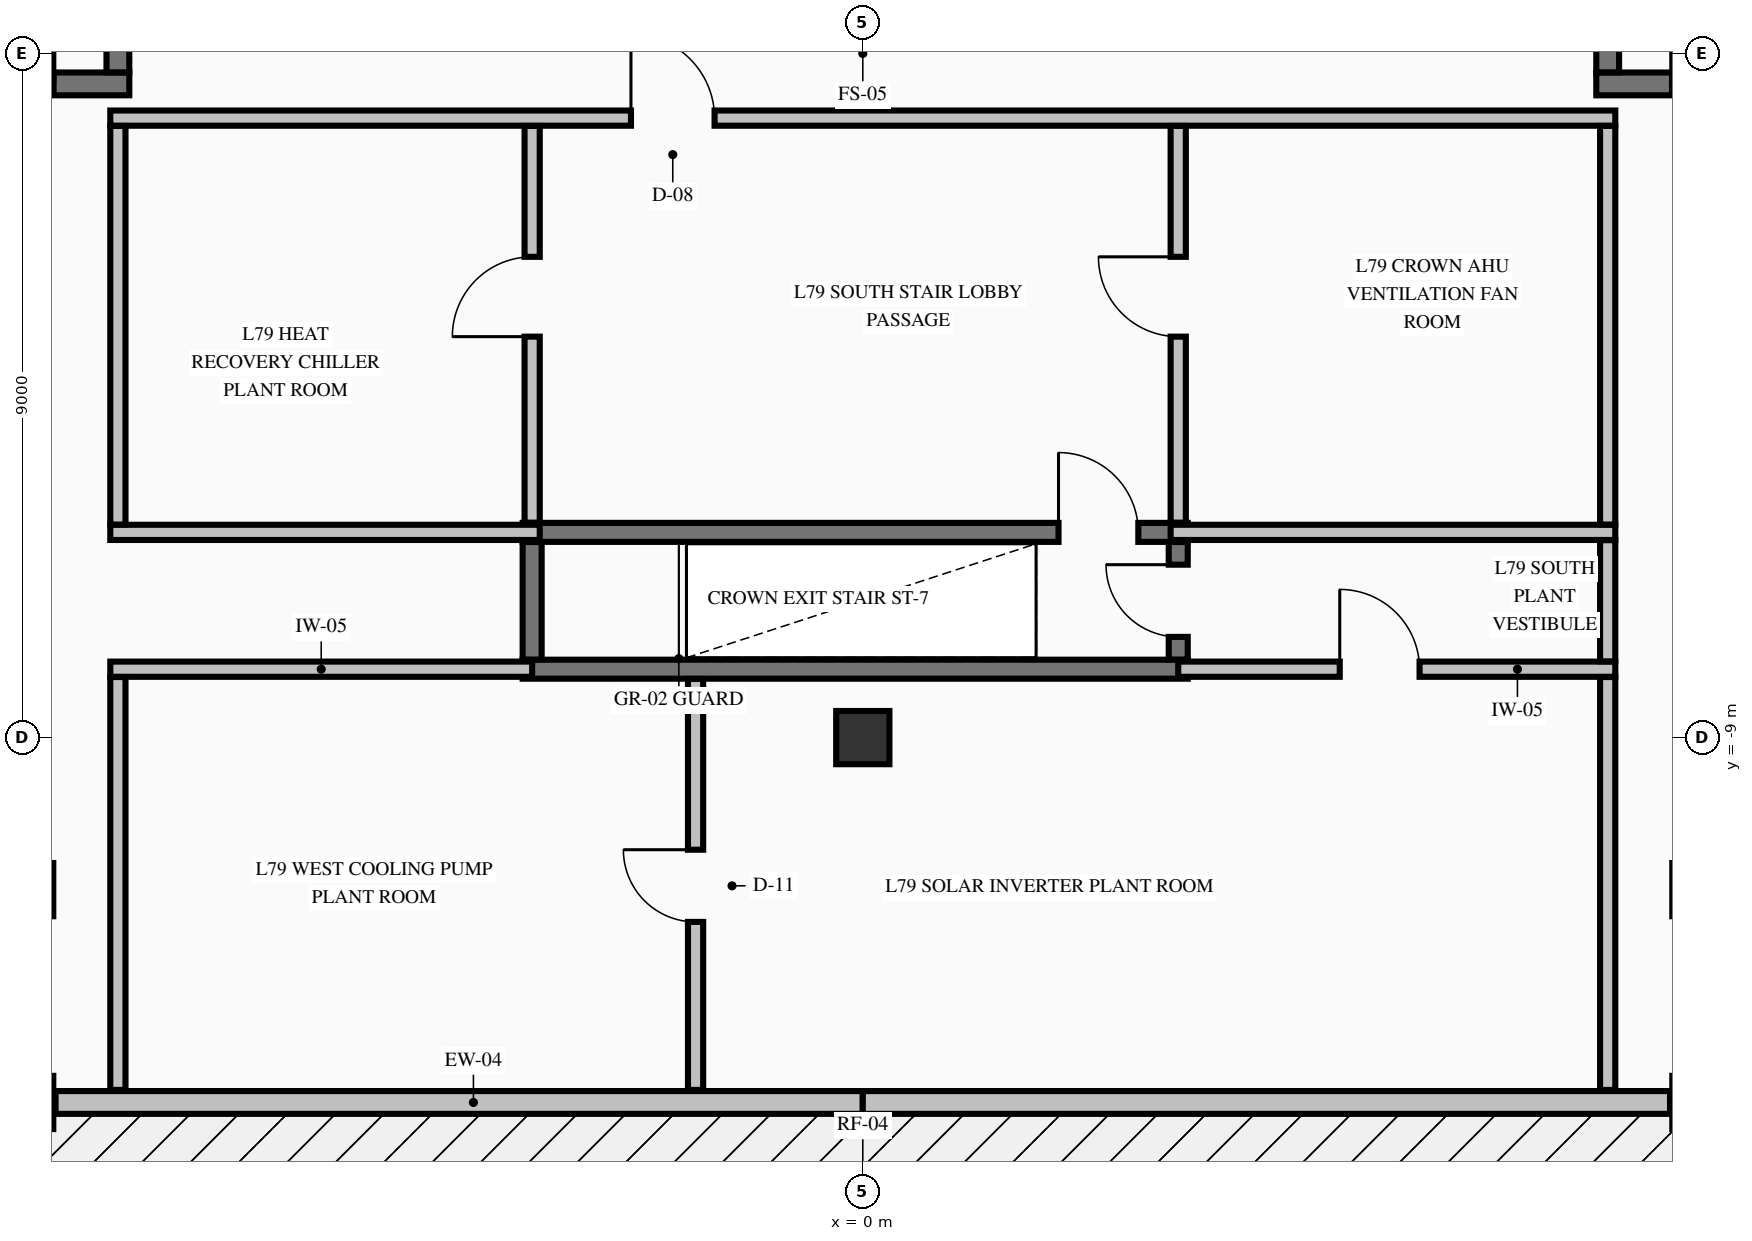
"""IFC4 building model, lengths in metres.
Left out: names, types, materials, properties, quantities, classifications, styles, units other than length and angle.
Written with IfcOpenShell. Run it as: python <this file> out.ifc"""

import sys

from ifc_helpers import new_model, si_unit, direction, frame, frame_2d, origin, origin_2d, place, context, subcontext, project, spatial, rectangle, extrude, element, fill, save


model = new_model("IFC4")
c1 = context("Model", 3, precision=1e-05, world=origin(), true_north=direction((0.0, 1.0)))
c2 = subcontext(c1, "Body", "Model", "MODEL_VIEW")
j1 = project(units=[si_unit("LENGTHUNIT", "METRE"), si_unit("PLANEANGLEUNIT", "RADIAN")], contexts=[c1])
p1 = place(None, origin())
s1 = spatial("IfcSite", under=j1, at=p1, CompositionType="ELEMENT")
p2 = place(p1, origin())
s2 = spatial("IfcBuilding", under=s1, at=p2, CompositionType="ELEMENT")
p3 = place(p2, frame((0.0, 0.0, 294.04)))
s3 = spatial("IfcBuildingStorey", under=s2, at=p3, CompositionType="ELEMENT", Elevation=294.04)
for number, where, z_axis, x_axis in (
    (1, (-11.0, -13.8, -0.325), (0.0, 0.0, 1.0), (1.0, 0.0, 0.0)),
    (2, (11.0, -13.8, -0.325), (0.0, 0.0, 1.0), (1.0, 0.0, 0.0)),
    (3, (-11.0, -11.0, -0.325), (0.0, 0.0, 1.0), (1.0, 0.0, 0.0)),
    (4, (11.0, -11.0, -0.325), (0.0, 0.0, 1.0), (1.0, 0.0, 0.0)),
    (5, (-11.0, 0.0, -0.325), (0.0, 0.0, 1.0), (1.0, 0.0, 0.0)),
    (6, (11.0, 0.0, -0.325), (0.0, 0.0, 1.0), (1.0, 0.0, 0.0)),
    (7, (0.0, -9.0, -0.325), (0.0, 0.0, 1.0), (1.0, 0.0, 0.0)),
):
    element("IfcColumn", number, at=place(p3, frame(where, z_axis=z_axis, x_axis=x_axis)), inside=s3, PredefinedType="COLUMN", context=c2, shape_type="SweptSolid", body=[
        extrude(rectangle(XDim=0.7, YDim=0.7, at=origin_2d()), origin(), (0.0, 0.0, 1.0), 2.935),
    ])
for number, where, z_axis, x_axis in (
    (8, (-10.62, -13.8, 0.0), (0.0, 0.0, 1.0), (1.0, 0.0, 0.0)),
    (9, (0.0, -13.8, 0.0), (0.0, 0.0, 1.0), (1.0, 0.0, 0.0)),
):
    element("IfcWall", number, at=place(p3, frame(where, z_axis=z_axis, x_axis=x_axis)), inside=s3, PredefinedType="STANDARD", context=c2, shape_type="SweptSolid", body=[
        extrude(rectangle(XDim=10.62, YDim=0.3, at=frame_2d((5.31, 0.0))), origin(), (0.0, 0.0, 1.0), 2.002),
    ])
p4 = place(p3, frame((-4.475, -8.1, 0.0), z_axis=(0.0, 0.0, 1.0), x_axis=(1.0, 0.0, 0.0)))
e10 = element("IfcWall", 10, at=p4, inside=s3, PredefinedType="SOLIDWALL", context=c2, shape_type="SweptSolid", body=[
    extrude(rectangle(XDim=8.75, YDim=0.25, at=frame_2d((4.375, 0.0))), origin(), (0.0, 0.0, 1.0), 2.61),
])
p5 = place(p3, frame((-4.475, -6.3, 0.0), z_axis=(0.0, 0.0, 1.0), x_axis=(1.0, 0.0, 0.0)))
e11 = element("IfcWall", 11, at=p5, inside=s3, PredefinedType="SOLIDWALL", context=c2, shape_type="SweptSolid", body=[
    extrude(rectangle(XDim=8.75, YDim=0.25, at=frame_2d((4.375, 0.0))), origin(), (0.0, 0.0, 1.0), 2.61),
])
p6 = place(p5, frame((7.05, 0.0, 0.0)))
e12 = element("IfcOpeningElement", 12, at=p6, cuts=e11, PredefinedType="OPENING", context=c2, shape_type="SweptSolid", body=[
    extrude(rectangle(XDim=1.05, YDim=2.15, at=frame_2d((0.525, 1.075))), frame((0.0, 0.135, 0.0), z_axis=(0.0, -1.0, 0.0), x_axis=(1.0, 0.0, 0.0)), (0.0, 0.0, 1.0), 0.27),
])
for number, where, z_axis, x_axis in (
    (13, (-10.646, -0.4, 0.0), (0.0, 0.0, 1.0), (1.0, 0.0, 0.0)),
    (14, (9.65, -0.4, 0.0), (0.0, 0.0, 1.0), (1.0, 0.0, 0.0)),
):
    element("IfcWall", number, at=place(p3, frame(where, z_axis=z_axis, x_axis=x_axis)), inside=s3, PredefinedType="SHEAR", context=c2, shape_type="SweptSolid", body=[
        extrude(rectangle(XDim=0.996, YDim=0.3, at=frame_2d((0.498, 0.0))), origin(), (0.0, 0.0, 1.0), 2.61),
    ])
p7 = place(p3, frame((-9.9, -8.1, 0.0), z_axis=(0.0, 0.0, 1.0), x_axis=(1.0, 0.0, 0.0)))
e15 = element("IfcWall", 15, at=p7, inside=s3, PredefinedType="PARTITIONING", context=c2, shape_type="SweptSolid", body=[
    extrude(rectangle(XDim=5.55, YDim=0.2, at=frame_2d((2.775, 0.0))), origin(), (0.0, 0.0, 1.0), 2.61),
])
p8 = place(p3, frame((4.15, -8.1, 0.0), z_axis=(0.0, 0.0, 1.0), x_axis=(1.0, 0.0, 0.0)))
e16 = element("IfcWall", 16, at=p8, inside=s3, PredefinedType="PARTITIONING", context=c2, shape_type="SweptSolid", body=[
    extrude(rectangle(XDim=5.75, YDim=0.2, at=frame_2d((2.875, 0.0))), origin(), (0.0, 0.0, 1.0), 2.61),
])
p9 = place(p8, frame((2.125, 0.0, 0.0)))
e17 = element("IfcOpeningElement", 17, at=p9, cuts=e16, PredefinedType="OPENING", context=c2, shape_type="SweptSolid", body=[
    extrude(rectangle(XDim=1.05, YDim=2.15, at=frame_2d((0.525, 1.075))), frame((0.0, 0.11, 0.0), z_axis=(0.0, -1.0, 0.0), x_axis=(1.0, 0.0, 0.0)), (0.0, 0.0, 1.0), 0.22),
])
p10 = place(p3, frame((-9.9, -6.3, 0.0), z_axis=(0.0, 0.0, 1.0), x_axis=(1.0, 0.0, 0.0)))
e18 = element("IfcWall", 18, at=p10, inside=s3, PredefinedType="PARTITIONING", context=c2, shape_type="SweptSolid", body=[
    extrude(rectangle(XDim=5.65, YDim=0.2, at=frame_2d((2.825, 0.0))), origin(), (0.0, 0.0, 1.0), 2.61),
])
p11 = place(p3, frame((4.05, -6.3, 0.0), z_axis=(0.0, 0.0, 1.0), x_axis=(1.0, 0.0, 0.0)))
e19 = element("IfcWall", 19, at=p11, inside=s3, PredefinedType="PARTITIONING", context=c2, shape_type="SweptSolid", body=[
    extrude(rectangle(XDim=5.85, YDim=0.2, at=frame_2d((2.925, 0.0))), origin(), (0.0, 0.0, 1.0), 2.61),
])
p12 = place(p3, frame((-9.9, -0.85, 0.0), z_axis=(0.0, 0.0, 1.0), x_axis=(1.0, 0.0, 0.0)))
e20 = element("IfcWall", 20, at=p12, inside=s3, PredefinedType="PARTITIONING", context=c2, shape_type="SweptSolid", body=[
    extrude(rectangle(XDim=19.8, YDim=0.2, at=frame_2d((9.9, 0.0))), origin(), (0.0, 0.0, 1.0), 2.61),
])
p13 = place(p12, frame((6.85, 0.0, 0.0)))
e21 = element("IfcOpeningElement", 21, at=p13, cuts=e20, PredefinedType="OPENING", context=c2, shape_type="SweptSolid", body=[
    extrude(rectangle(XDim=1.1, YDim=2.15, at=frame_2d((0.55, 1.075))), frame((0.0, 0.11, 0.0), z_axis=(0.0, -1.0, 0.0), x_axis=(1.0, 0.0, 0.0)), (0.0, 0.0, 1.0), 0.22),
])
p14 = place(p3, frame((-9.8, -0.248, 0.0), z_axis=(0.0, 0.0, 1.0), x_axis=(0.0, 1.0, 0.0)))
e22 = element("IfcWall", 22, at=p14, inside=s3, PredefinedType="SHEAR", context=c2, shape_type="SweptSolid", body=[
    extrude(rectangle(XDim=3.046, YDim=0.3, at=frame_2d((1.523, 0.0))), origin(), (0.0, 0.0, 1.0), 2.61),
])
p15 = place(p14, frame((1.023, 0.0, 0.0)))
e23 = element("IfcOpeningElement", 23, at=p15, cuts=e22, PredefinedType="OPENING", context=c2, shape_type="SweptSolid", body=[
    extrude(rectangle(XDim=1.05, YDim=2.15, at=frame_2d((0.525, 1.075))), frame((0.0, 0.16, 0.0), z_axis=(0.0, -1.0, 0.0), x_axis=(1.0, 0.0, 0.0)), (0.0, 0.0, 1.0), 0.32),
])
p16 = place(p3, frame((-4.35, -7.973, 0.0), z_axis=(0.0, 0.0, 1.0), x_axis=(0.0, 1.0, 0.0)))
e24 = element("IfcWall", 24, at=p16, inside=s3, PredefinedType="SOLIDWALL", context=c2, shape_type="SweptSolid", body=[
    extrude(rectangle(XDim=1.546, YDim=0.25, at=frame_2d((0.773, 0.0))), origin(), (0.0, 0.0, 1.0), 2.61),
])
p17 = place(p3, frame((4.15, -7.973, 0.0), z_axis=(0.0, 0.0, 1.0), x_axis=(0.0, 1.0, 0.0)))
e25 = element("IfcWall", 25, at=p17, inside=s3, PredefinedType="SOLIDWALL", context=c2, shape_type="SweptSolid", body=[
    extrude(rectangle(XDim=1.546, YDim=0.25, at=frame_2d((0.773, 0.0))), origin(), (0.0, 0.0, 1.0), 2.61),
])
p18 = place(p17, frame((0.298, 0.0, 0.0)))
e26 = element("IfcOpeningElement", 26, at=p18, cuts=e25, PredefinedType="OPENING", context=c2, shape_type="SweptSolid", body=[
    extrude(rectangle(XDim=0.95, YDim=2.15, at=frame_2d((0.475, 1.075))), frame((0.0, 0.135, 0.0), z_axis=(0.0, -1.0, 0.0), x_axis=(1.0, 0.0, 0.0)), (0.0, 0.0, 1.0), 0.27),
])
p19 = place(p3, frame((9.8, -0.248, 0.0), z_axis=(0.0, 0.0, 1.0), x_axis=(0.0, 1.0, 0.0)))
e27 = element("IfcWall", 27, at=p19, inside=s3, PredefinedType="SHEAR", context=c2, shape_type="SweptSolid", body=[
    extrude(rectangle(XDim=3.046, YDim=0.3, at=frame_2d((1.523, 0.0))), origin(), (0.0, 0.0, 1.0), 2.61),
])
p20 = place(p19, frame((1.023, 0.0, 0.0)))
e28 = element("IfcOpeningElement", 28, at=p20, cuts=e27, PredefinedType="OPENING", context=c2, shape_type="SweptSolid", body=[
    extrude(rectangle(XDim=1.05, YDim=2.15, at=frame_2d((0.525, 1.075))), frame((0.0, 0.16, 0.0), z_axis=(0.0, -1.0, 0.0), x_axis=(1.0, 0.0, 0.0)), (0.0, 0.0, 1.0), 0.32),
])
p21 = place(p3, frame((-9.8, -13.635, 0.0), z_axis=(0.0, 0.0, 1.0), x_axis=(0.0, 1.0, 0.0)))
e29 = element("IfcWall", 29, at=p21, inside=s3, PredefinedType="PARTITIONING", context=c2, shape_type="SweptSolid", body=[
    extrude(rectangle(XDim=5.432, YDim=0.2, at=frame_2d((2.716, 0.0))), origin(), (0.0, 0.0, 1.0), 2.61),
])
p22 = place(p3, frame((-9.8, -6.197, 0.0), z_axis=(0.0, 0.0, 1.0), x_axis=(0.0, 1.0, 0.0)))
e30 = element("IfcWall", 30, at=p22, inside=s3, PredefinedType="PARTITIONING", context=c2, shape_type="SweptSolid", body=[
    extrude(rectangle(XDim=5.244, YDim=0.2, at=frame_2d((2.622, 0.0))), origin(), (0.0, 0.0, 1.0), 2.61),
])
p23 = place(p3, frame((-4.35, -6.172, 0.0), z_axis=(0.0, 0.0, 1.0), x_axis=(0.0, 1.0, 0.0)))
e31 = element("IfcWall", 31, at=p23, inside=s3, PredefinedType="PARTITIONING", context=c2, shape_type="SweptSolid", body=[
    extrude(rectangle(XDim=5.219, YDim=0.2, at=frame_2d((2.61, 0.0))), origin(), (0.0, 0.0, 1.0), 2.61),
])
p24 = place(p23, frame((2.447, 0.0, 0.0)))
e32 = element("IfcOpeningElement", 32, at=p24, cuts=e31, PredefinedType="OPENING", context=c2, shape_type="SweptSolid", body=[
    extrude(rectangle(XDim=1.05, YDim=2.15, at=frame_2d((0.525, 1.075))), frame((0.0, 0.11, 0.0), z_axis=(0.0, -1.0, 0.0), x_axis=(1.0, 0.0, 0.0)), (0.0, 0.0, 1.0), 0.22),
])
p25 = place(p3, frame((-2.2, -13.635, 0.0), z_axis=(0.0, 0.0, 1.0), x_axis=(0.0, 1.0, 0.0)))
e33 = element("IfcWall", 33, at=p25, inside=s3, PredefinedType="PARTITIONING", context=c2, shape_type="SweptSolid", body=[
    extrude(rectangle(XDim=5.407, YDim=0.2, at=frame_2d((2.704, 0.0))), origin(), (0.0, 0.0, 1.0), 2.61),
])
p26 = place(p25, frame((2.21, 0.0, 0.0)))
e34 = element("IfcOpeningElement", 34, at=p26, cuts=e33, PredefinedType="OPENING", context=c2, shape_type="SweptSolid", body=[
    extrude(rectangle(XDim=0.95, YDim=2.15, at=frame_2d((0.475, 1.075))), frame((0.0, 0.11, 0.0), z_axis=(0.0, -1.0, 0.0), x_axis=(1.0, 0.0, 0.0)), (0.0, 0.0, 1.0), 0.22),
])
p27 = place(p3, frame((4.15, -6.172, 0.0), z_axis=(0.0, 0.0, 1.0), x_axis=(0.0, 1.0, 0.0)))
e35 = element("IfcWall", 35, at=p27, inside=s3, PredefinedType="PARTITIONING", context=c2, shape_type="SweptSolid", body=[
    extrude(rectangle(XDim=5.219, YDim=0.2, at=frame_2d((2.61, 0.0))), origin(), (0.0, 0.0, 1.0), 2.61),
])
p28 = place(p27, frame((2.447, 0.0, 0.0)))
e36 = element("IfcOpeningElement", 36, at=p28, cuts=e35, PredefinedType="OPENING", context=c2, shape_type="SweptSolid", body=[
    extrude(rectangle(XDim=1.05, YDim=2.15, at=frame_2d((0.525, 1.075))), frame((0.0, 0.11, 0.0), z_axis=(0.0, -1.0, 0.0), x_axis=(1.0, 0.0, 0.0)), (0.0, 0.0, 1.0), 0.22),
])
p29 = place(p3, frame((9.8, -13.635, 0.0), z_axis=(0.0, 0.0, 1.0), x_axis=(0.0, 1.0, 0.0)))
e37 = element("IfcWall", 37, at=p29, inside=s3, PredefinedType="PARTITIONING", context=c2, shape_type="SweptSolid", body=[
    extrude(rectangle(XDim=5.432, YDim=0.2, at=frame_2d((2.716, 0.0))), origin(), (0.0, 0.0, 1.0), 2.61),
])
p30 = place(p3, frame((9.8, -7.997, 0.0), z_axis=(0.0, 0.0, 1.0), x_axis=(0.0, 1.0, 0.0)))
e38 = element("IfcWall", 38, at=p30, inside=s3, PredefinedType="PARTITIONING", context=c2, shape_type="SweptSolid", body=[
    extrude(rectangle(XDim=1.594, YDim=0.2, at=frame_2d((0.797, 0.0))), origin(), (0.0, 0.0, 1.0), 2.61),
])
p31 = place(p3, frame((9.8, -6.197, 0.0), z_axis=(0.0, 0.0, 1.0), x_axis=(0.0, 1.0, 0.0)))
e39 = element("IfcWall", 39, at=p31, inside=s3, PredefinedType="PARTITIONING", context=c2, shape_type="SweptSolid", body=[
    extrude(rectangle(XDim=5.244, YDim=0.2, at=frame_2d((2.622, 0.0))), origin(), (0.0, 0.0, 1.0), 2.61),
])
p32 = place(p6, origin())
e40 = element("IfcDoor", 40, at=p32, inside=s3, OperationType="SINGLE_SWING_LEFT", PredefinedType="DOOR", context=c2, shape_type="SweptSolid", body=[
    extrude(rectangle(XDim=1.05, YDim=2.15, at=frame_2d((0.525, 1.075))), frame((0.0, 0.025, 0.0), z_axis=(0.0, -1.0, 0.0), x_axis=(1.0, 0.0, 0.0)), (0.0, 0.0, 1.0), 0.05),
])
fill(e12, e40)
p33 = place(p13, origin())
e41 = element("IfcDoor", 41, at=p33, inside=s3, OperationType="SINGLE_SWING_LEFT", PredefinedType="DOOR", context=c2, shape_type="SweptSolid", body=[
    extrude(rectangle(XDim=1.1, YDim=2.15, at=frame_2d((0.55, 1.075))), frame((0.0, 0.025, 0.0), z_axis=(0.0, -1.0, 0.0), x_axis=(1.0, 0.0, 0.0)), (0.0, 0.0, 1.0), 0.05),
])
fill(e21, e41)
p34 = place(p24, origin())
e42 = element("IfcDoor", 42, at=p34, inside=s3, OperationType="SINGLE_SWING_LEFT", PredefinedType="DOOR", context=c2, shape_type="SweptSolid", body=[
    extrude(rectangle(XDim=1.05, YDim=2.15, at=frame_2d((0.525, 1.075))), frame((0.0, 0.025, 0.0), z_axis=(0.0, -1.0, 0.0), x_axis=(1.0, 0.0, 0.0)), (0.0, 0.0, 1.0), 0.05),
])
fill(e32, e42)
p35 = place(p28, origin())
e43 = element("IfcDoor", 43, at=p35, inside=s3, OperationType="SINGLE_SWING_RIGHT", PredefinedType="DOOR", context=c2, shape_type="SweptSolid", body=[
    extrude(rectangle(XDim=1.05, YDim=2.15, at=frame_2d((0.525, 1.075))), frame((0.0, 0.025, 0.0), z_axis=(0.0, -1.0, 0.0), x_axis=(1.0, 0.0, 0.0)), (0.0, 0.0, 1.0), 0.05),
])
fill(e36, e43)
p36 = place(p26, origin())
e44 = element("IfcDoor", 44, at=p36, inside=s3, OperationType="SINGLE_SWING_RIGHT", PredefinedType="DOOR", context=c2, shape_type="SweptSolid", body=[
    extrude(rectangle(XDim=0.95, YDim=2.15, at=frame_2d((0.475, 1.075))), frame((0.0, 0.025, 0.0), z_axis=(0.0, -1.0, 0.0), x_axis=(1.0, 0.0, 0.0)), (0.0, 0.0, 1.0), 0.05),
])
fill(e34, e44)
p37 = place(p18, origin())
e45 = element("IfcDoor", 45, at=p37, inside=s3, OperationType="SINGLE_SWING_RIGHT", PredefinedType="DOOR", context=c2, shape_type="SweptSolid", body=[
    extrude(rectangle(XDim=0.95, YDim=2.15, at=frame_2d((0.475, 1.075))), frame((0.0, 0.025, 0.0), z_axis=(0.0, -1.0, 0.0), x_axis=(1.0, 0.0, 0.0)), (0.0, 0.0, 1.0), 0.05),
])
fill(e26, e45)
p38 = place(p9, origin())
e46 = element("IfcDoor", 46, at=p38, inside=s3, OperationType="SINGLE_SWING_LEFT", PredefinedType="DOOR", context=c2, shape_type="SweptSolid", body=[
    extrude(rectangle(XDim=1.05, YDim=2.15, at=frame_2d((0.525, 1.075))), frame((0.0, 0.025, 0.0), z_axis=(0.0, -1.0, 0.0), x_axis=(1.0, 0.0, 0.0)), (0.0, 0.0, 1.0), 0.05),
])
fill(e17, e46)
save(model, sys.argv[1])
